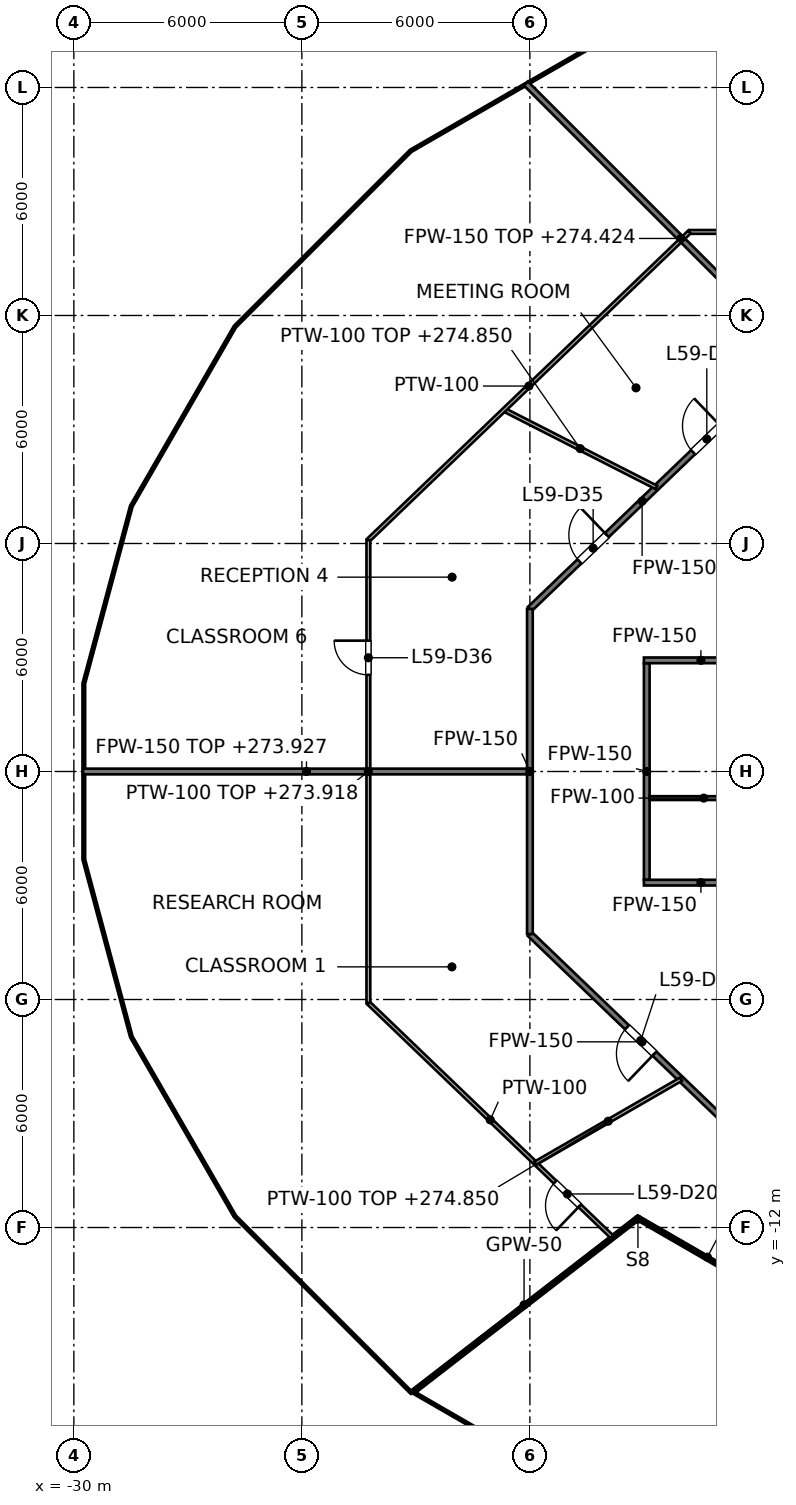
"""IFC4 building model, lengths in metres.
Left out: names, types, materials, properties, quantities, classifications, styles, units other than length and angle.
Written with IfcOpenShell. Run it as: python <this file> out.ifc"""

import sys

from ifc_helpers import new_model, si_unit, direction, frame, frame_2d, origin, place, context, subcontext, project, spatial, rectangle, extrude, element, fill, save


model = new_model("IFC4")
c1 = context("Model", 3, precision=1e-05, world=origin(), true_north=direction((0.0, 1.0)))
c2 = subcontext(c1, "Body", "Model", "MODEL_VIEW")
j1 = project(units=[si_unit("LENGTHUNIT", "METRE"), si_unit("PLANEANGLEUNIT", "RADIAN")], contexts=[c1])
p1 = place(None, origin())
s1 = spatial("IfcSite", under=j1, at=p1, CompositionType="ELEMENT")
p2 = place(p1, origin())
s2 = spatial("IfcBuilding", under=s1, at=p2, CompositionType="ELEMENT")
p3 = place(p2, frame((0.0, 0.0, 271.0)))
s3 = spatial("IfcBuildingStorey", under=s2, at=p3, CompositionType="ELEMENT", Elevation=271.0)
p4 = place(p3, frame((-14.925, -2.85, 0.0), z_axis=(0.0, 0.0, 1.0), x_axis=(0.0, 1.0, 0.0)))
e1 = element("IfcWall", 1, at=p4, inside=s3, PredefinedType="PARTITIONING", context=c2, shape_type="SweptSolid", body=[
    extrude(rectangle(XDim=5.7, YDim=0.15, at=frame_2d((2.85, 0.0))), origin(), (0.0, 0.0, 1.0), 2.918),
])
for number, where, z_axis, x_axis in (
    (2, (-15.0, 2.925, 0.0), (0.0, 0.0, 1.0), (1.0, 0.0, 0.0)),
    (3, (-15.0, -2.925, 0.0), (0.0, 0.0, 1.0), (1.0, 0.0, 0.0)),
):
    element("IfcWall", number, at=place(p3, frame(where, z_axis=z_axis, x_axis=x_axis)), inside=s3, PredefinedType="PARTITIONING", context=c2, shape_type="SweptSolid", body=[
        extrude(rectangle(XDim=3.0, YDim=0.15, at=frame_2d((1.5, 0.0))), origin(), (0.0, 0.0, 1.0), 2.918),
    ])
p5 = place(p3, frame((-14.85, -0.7, 0.0), z_axis=(0.0, 0.0, 1.0), x_axis=(1.0, 0.0, 0.0)))
e4 = element("IfcWall", 4, at=p5, inside=s3, PredefinedType="PARTITIONING", context=c2, shape_type="SweptSolid", body=[
    extrude(rectangle(XDim=2.85, YDim=0.1, at=frame_2d((1.425, 0.0))), origin(), (0.0, 0.0, 1.0), 3.85),
])
p6 = place(p3, frame((-18.105, 18.105, 0.0), z_axis=(0.0, 0.0, 1.0), x_axis=(0.707106781187, -0.707106781187, 0.0)))
e5 = element("IfcWall", 5, at=p6, inside=s3, PredefinedType="PARTITIONING", context=c2, shape_type="SweptSolid", body=[
    extrude(rectangle(XDim=11.534, YDim=0.15, at=frame_2d((5.767, 0.0))), origin(), (0.0, 0.0, 1.0), 3.424),
])
p7 = place(p3, frame((-18.0, -4.278, 0.0), z_axis=(0.0, 0.0, 1.0), x_axis=(0.721260976692, -0.69266341285, 0.0)))
e6 = element("IfcWall", 6, at=p7, inside=s3, PredefinedType="PARTITIONING", context=c2, shape_type="SweptSolid", body=[
    extrude(rectangle(XDim=8.187, YDim=0.15, at=frame_2d((4.094, 0.0))), origin(), (0.0, 0.0, 1.0), 2.918),
])
p8 = place(p7, frame((3.544, 0.0, 0.0)))
e7 = element("IfcOpeningElement", 7, at=p8, cuts=e6, PredefinedType="OPENING", context=c2, shape_type="SweptSolid", body=[
    extrude(rectangle(XDim=1.0, YDim=2.1, at=frame_2d((0.5, 1.05))), frame((0.0, 0.075, 0.0), z_axis=(0.0, -1.0, 0.0), x_axis=(1.0, 0.0, 0.0)), (0.0, 0.0, 1.0), 0.15),
])
p9 = place(p3, frame((-29.758, 0.0, 0.0), z_axis=(0.0, 0.0, 1.0), x_axis=(1.0, 0.0, 0.0)))
e8 = element("IfcWall", 8, at=p9, inside=s3, PredefinedType="PARTITIONING", context=c2, shape_type="SweptSolid", body=[
    extrude(rectangle(XDim=11.758, YDim=0.15, at=frame_2d((5.879, 0.0))), origin(), (0.0, 0.0, 1.0), 2.927),
])
p10 = place(p3, frame((-18.0, 4.278, 0.0), z_axis=(0.0, 0.0, 1.0), x_axis=(0.721231770915, 0.692693823145, 0.0)))
e9 = element("IfcWall", 9, at=p10, inside=s3, PredefinedType="PARTITIONING", context=c2, shape_type="SweptSolid", body=[
    extrude(rectangle(XDim=8.187, YDim=0.15, at=frame_2d((4.094, 0.0))), origin(), (0.0, 0.0, 1.0), 2.918),
])
p11 = place(p10, frame((5.954, 0.0, 0.0)))
e10 = element("IfcOpeningElement", 10, at=p11, cuts=e9, PredefinedType="OPENING", context=c2, shape_type="SweptSolid", body=[
    extrude(rectangle(XDim=1.0, YDim=2.1, at=frame_2d((0.5, 1.05))), frame((0.0, 0.075, 0.0), z_axis=(0.0, -1.0, 0.0), x_axis=(1.0, 0.0, 0.0)), (0.0, 0.0, 1.0), 0.15),
])
p12 = place(p10, frame((1.807, 0.0, 0.0)))
e11 = element("IfcOpeningElement", 11, at=p12, cuts=e9, PredefinedType="OPENING", context=c2, shape_type="SweptSolid", body=[
    extrude(rectangle(XDim=1.0, YDim=2.1, at=frame_2d((0.5, 1.05))), frame((0.0, 0.075, 0.0), z_axis=(0.0, -1.0, 0.0), x_axis=(1.0, 0.0, 0.0)), (0.0, 0.0, 1.0), 0.15),
])
p13 = place(p3, frame((-18.0, -4.278, 0.0), z_axis=(0.0, 0.0, 1.0), x_axis=(0.0, 1.0, 0.0)))
e12 = element("IfcWall", 12, at=p13, inside=s3, PredefinedType="PARTITIONING", context=c2, shape_type="SweptSolid", body=[
    extrude(rectangle(XDim=8.556, YDim=0.15, at=frame_2d((4.278, 0.0))), origin(), (0.0, 0.0, 1.0), 2.918),
])
p14 = place(p3, frame((-15.161, -11.722, 0.0), z_axis=(0.0, 0.0, 1.0), x_axis=(0.866015533237, -0.5000170959, 0.0)))
e13 = element("IfcWall", 13, at=p14, inside=s3, PredefinedType="PARTITIONING", context=c2, shape_type="SweptSolid", body=[
    extrude(rectangle(XDim=4.232, YDim=0.05, at=frame_2d((2.116, 0.0))), origin(), (0.0, 0.0, 1.0), 2.927),
])
p15 = place(p3, frame((-21.146, -16.349, 0.0), z_axis=(0.0, 0.0, 1.0), x_axis=(0.791194145186, 0.611565061644, 0.0)))
e14 = element("IfcWall", 14, at=p15, inside=s3, PredefinedType="PARTITIONING", context=c2, shape_type="SweptSolid", body=[
    extrude(rectangle(XDim=7.565, YDim=0.05, at=frame_2d((3.782, 0.0))), origin(), (0.0, 0.0, 1.0), 2.927),
])
p16 = place(p3, frame((-22.25, -6.089, 0.0), z_axis=(0.0, 0.0, 1.0), x_axis=(0.721325844404, -0.692595860654, 0.0)))
e15 = element("IfcWall", 15, at=p16, inside=s3, PredefinedType="PARTITIONING", context=c2, shape_type="SweptSolid", body=[
    extrude(rectangle(XDim=8.889, YDim=0.1, at=frame_2d((4.444, 0.0))), origin(), (0.0, 0.0, 1.0), 2.927),
])
p17 = place(p16, frame((6.81, 0.0, 0.0)))
e16 = element("IfcOpeningElement", 16, at=p17, cuts=e15, PredefinedType="OPENING", context=c2, shape_type="SweptSolid", body=[
    extrude(rectangle(XDim=0.9, YDim=2.1, at=frame_2d((0.45, 1.05))), frame((0.0, 0.05, 0.0), z_axis=(0.0, -1.0, 0.0), x_axis=(1.0, 0.0, 0.0)), (0.0, 0.0, 1.0), 0.1),
])
p18 = place(p3, frame((-18.68, 9.518, 0.0), z_axis=(0.0, 0.0, 1.0), x_axis=(0.890982762067, -0.454037132512, 0.0)))
e17 = element("IfcWall", 17, at=p18, inside=s3, PredefinedType="PARTITIONING", context=c2, shape_type="SweptSolid", body=[
    extrude(rectangle(XDim=4.5, YDim=0.1, at=frame_2d((2.25, 0.0))), origin(), (0.0, 0.0, 1.0), 3.85),
])
p19 = place(p3, frame((-13.805, 14.199, 0.0), z_axis=(0.0, 0.0, 1.0), x_axis=(1.0, 0.0, 0.0)))
e18 = element("IfcWall", 18, at=p19, inside=s3, PredefinedType="PARTITIONING", context=c2, shape_type="SweptSolid", body=[
    extrude(rectangle(XDim=27.61, YDim=0.1, at=frame_2d((13.805, 0.0))), origin(), (0.0, 0.0, 1.0), 2.927),
])
p20 = place(p19, frame((20.047, 0.0, 0.0)))
e19 = element("IfcOpeningElement", 19, at=p20, cuts=e18, PredefinedType="OPENING", context=c2, shape_type="SweptSolid", body=[
    extrude(rectangle(XDim=0.9, YDim=2.1, at=frame_2d((0.45, 1.05))), frame((0.0, 0.05, 0.0), z_axis=(0.0, -1.0, 0.0), x_axis=(1.0, 0.0, 0.0)), (0.0, 0.0, 1.0), 0.1),
])
p21 = place(p19, frame((4.928, 0.0, 0.0)))
e20 = element("IfcOpeningElement", 20, at=p21, cuts=e18, PredefinedType="OPENING", context=c2, shape_type="SweptSolid", body=[
    extrude(rectangle(XDim=1.8, YDim=2.1, at=frame_2d((0.9, 1.05))), frame((0.0, 0.05, 0.0), z_axis=(0.0, -1.0, 0.0), x_axis=(1.0, 0.0, 0.0)), (0.0, 0.0, 1.0), 0.1),
])
p22 = place(p3, frame((-17.856, -10.309, 0.0), z_axis=(0.0, 0.0, 1.0), x_axis=(0.866051440883, 0.49995489971, 0.0)))
e21 = element("IfcWall", 21, at=p22, inside=s3, PredefinedType="PARTITIONING", context=c2, shape_type="SweptSolid", body=[
    extrude(rectangle(XDim=4.425, YDim=0.1, at=frame_2d((2.212, 0.0))), origin(), (0.0, 0.0, 1.0), 3.85),
])
p23 = place(p3, frame((-22.25, 6.089, 0.0), z_axis=(0.0, 0.0, 1.0), x_axis=(0.721429821881, 0.692487553751, 0.0)))
e22 = element("IfcWall", 22, at=p23, inside=s3, PredefinedType="PARTITIONING", context=c2, shape_type="SweptSolid", body=[
    extrude(rectangle(XDim=11.708, YDim=0.1, at=frame_2d((5.854, 0.0))), origin(), (0.0, 0.0, 1.0), 2.927),
])
p24 = place(p3, frame((-22.25, -6.089, 0.0), z_axis=(0.0, 0.0, 1.0), x_axis=(0.0, 1.0, 0.0)))
e23 = element("IfcWall", 23, at=p24, inside=s3, PredefinedType="PARTITIONING", context=c2, shape_type="SweptSolid", body=[
    extrude(rectangle(XDim=12.178, YDim=0.1, at=frame_2d((6.089, 0.0))), origin(), (0.0, 0.0, 1.0), 2.918),
])
p25 = place(p24, frame((8.632, 0.0, 0.0)))
e24 = element("IfcOpeningElement", 24, at=p25, cuts=e23, PredefinedType="OPENING", context=c2, shape_type="SweptSolid", body=[
    extrude(rectangle(XDim=0.9, YDim=2.1, at=frame_2d((0.45, 1.05))), frame((0.0, 0.05, 0.0), z_axis=(0.0, -1.0, 0.0), x_axis=(1.0, 0.0, 0.0)), (0.0, 0.0, 1.0), 0.1),
])
p26 = place(p8, origin())
e25 = element("IfcDoor", 25, at=p26, inside=s3, OperationType="SINGLE_SWING_RIGHT", PredefinedType="DOOR", context=c2, shape_type="SweptSolid", body=[
    extrude(rectangle(XDim=1.0, YDim=2.1, at=frame_2d((0.5, 1.05))), frame((0.0, 0.025, 0.0), z_axis=(0.0, -1.0, 0.0), x_axis=(1.0, 0.0, 0.0)), (0.0, 0.0, 1.0), 0.05),
])
fill(e7, e25)
p27 = place(p17, origin())
e26 = element("IfcDoor", 26, at=p27, inside=s3, OperationType="SINGLE_SWING_RIGHT", PredefinedType="DOOR", context=c2, shape_type="SweptSolid", body=[
    extrude(rectangle(XDim=0.9, YDim=2.1, at=frame_2d((0.45, 1.05))), frame((0.0, 0.025, 0.0), z_axis=(0.0, -1.0, 0.0), x_axis=(1.0, 0.0, 0.0)), (0.0, 0.0, 1.0), 0.05),
])
fill(e16, e26)
p28 = place(p11, origin())
e27 = element("IfcDoor", 27, at=p28, inside=s3, OperationType="SINGLE_SWING_RIGHT", PredefinedType="DOOR", context=c2, shape_type="SweptSolid", body=[
    extrude(rectangle(XDim=1.0, YDim=2.1, at=frame_2d((0.5, 1.05))), frame((0.0, 0.025, 0.0), z_axis=(0.0, -1.0, 0.0), x_axis=(1.0, 0.0, 0.0)), (0.0, 0.0, 1.0), 0.05),
])
fill(e10, e27)
p29 = place(p12, origin())
e28 = element("IfcDoor", 28, at=p29, inside=s3, OperationType="SINGLE_SWING_RIGHT", PredefinedType="DOOR", context=c2, shape_type="SweptSolid", body=[
    extrude(rectangle(XDim=1.0, YDim=2.1, at=frame_2d((0.5, 1.05))), frame((0.0, 0.025, 0.0), z_axis=(0.0, -1.0, 0.0), x_axis=(1.0, 0.0, 0.0)), (0.0, 0.0, 1.0), 0.05),
])
fill(e11, e28)
p30 = place(p25, origin())
e29 = element("IfcDoor", 29, at=p30, inside=s3, OperationType="SINGLE_SWING_RIGHT", PredefinedType="DOOR", context=c2, shape_type="SweptSolid", body=[
    extrude(rectangle(XDim=0.9, YDim=2.1, at=frame_2d((0.45, 1.05))), frame((0.0, 0.025, 0.0), z_axis=(0.0, -1.0, 0.0), x_axis=(1.0, 0.0, 0.0)), (0.0, 0.0, 1.0), 0.05),
])
fill(e24, e29)
save(model, sys.argv[1])
